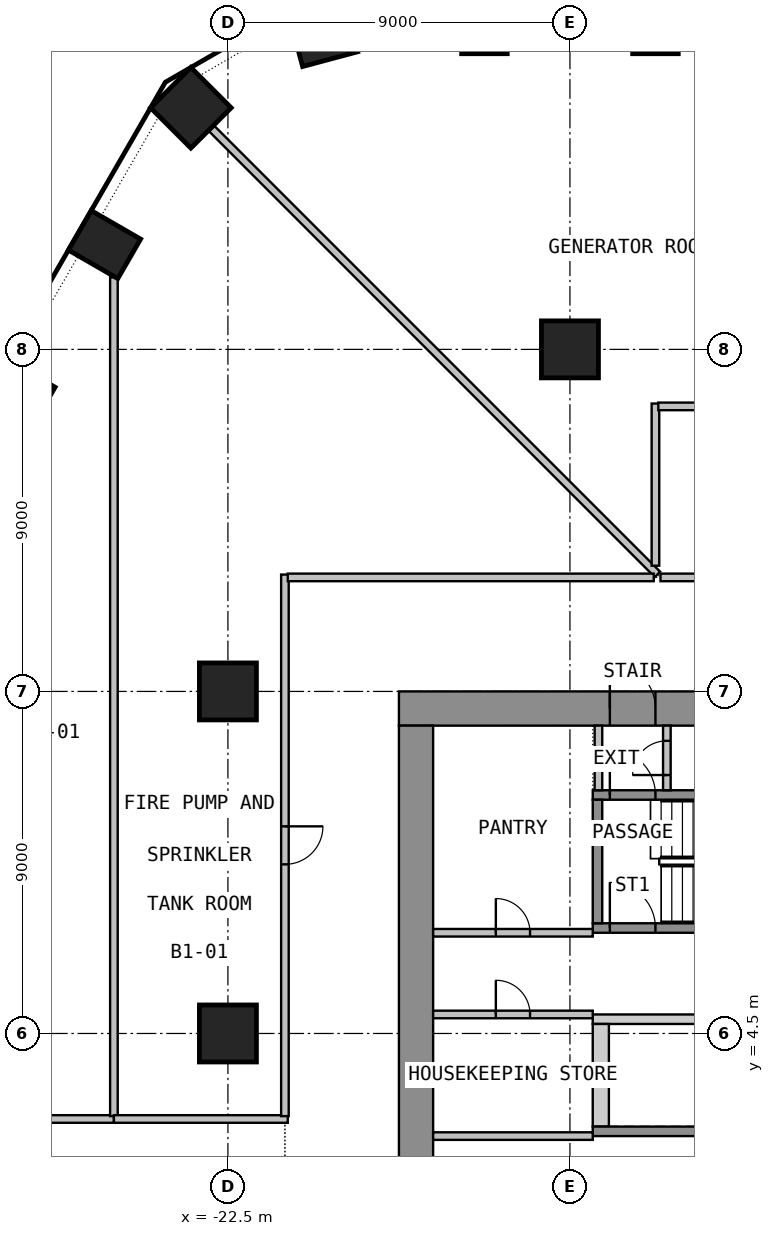
"""IFC4 building model, lengths in metres.
Left out: names, types, materials, properties, quantities, classifications, styles, units other than length and angle.
Written with IfcOpenShell. Run it as: python <this file> out.ifc"""

import sys

from ifc_helpers import new_model, si_unit, direction, frame, frame_2d, origin, origin_2d, place, context, subcontext, project, spatial, polyline, rectangle, circle, outline, extrude, element, fill, save


model = new_model("IFC4")
c1 = context("Model", 3, precision=1e-05, world=origin(), true_north=direction((0.0, 1.0)))
c2 = subcontext(c1, "Body", "Model", "MODEL_VIEW")
j1 = project(units=[si_unit("LENGTHUNIT", "METRE"), si_unit("PLANEANGLEUNIT", "RADIAN")], contexts=[c1])
p1 = place(None, origin())
s1 = spatial("IfcSite", under=j1, at=p1, CompositionType="ELEMENT")
p2 = place(p1, origin())
s2 = spatial("IfcBuilding", under=s1, at=p2, CompositionType="ELEMENT")
p3 = place(p2, frame((0.0, 0.0, -5.0)))
s3 = spatial("IfcBuildingStorey", under=s2, at=p3, CompositionType="ELEMENT", Elevation=-5.0)
for number, where, z_axis, x_axis in (
    (1, (-11.25, 31.03, 0.0), (0.0, 0.0, 1.0), (-1.0, 0.0, 0.0)),
    (2, (-15.75, 31.03, 0.0), (0.0, 0.0, 1.0), (-1.0, 0.0, 0.0)),
):
    element("IfcColumn", number, at=place(p3, frame(where, z_axis=z_axis, x_axis=x_axis)), inside=s3, PredefinedType="COLUMN", context=c2, shape_type="SweptSolid", body=[
        extrude(rectangle(XDim=1.2, YDim=1.5, at=origin_2d()), origin(), (0.0, 0.0, 1.0), 4.55),
    ])
for number, where, z_axis, x_axis in (
    (3, (-20.004, 30.861, 0.0), (0.0, 0.0, 1.0), (-0.966, -0.259, 0.0)),
    (4, (-23.475, 28.857, 0.0), (0.0, 0.0, 1.0), (-0.707, -0.707, 0.0)),
):
    element("IfcColumn", number, at=place(p3, frame(where, z_axis=z_axis, x_axis=x_axis)), inside=s3, PredefinedType="COLUMN", context=c2, shape_type="SweptSolid", body=[
        extrude(rectangle(XDim=1.5, YDim=1.5, at=origin_2d()), origin(), (0.0, 0.0, 1.0), 4.55),
    ])
for number, where, z_axis, x_axis in (
    (5, (-25.748, 25.258, 0.0), (0.0, 0.0, 1.0), (-0.5, -0.866, 0.0)),
    (6, (-27.998, 21.361, 0.0), (0.0, 0.0, 1.0), (-0.5, -0.866, 0.0)),
):
    element("IfcColumn", number, at=place(p3, frame(where, z_axis=z_axis, x_axis=x_axis)), inside=s3, PredefinedType="COLUMN", context=c2, shape_type="SweptSolid", body=[
        extrude(rectangle(XDim=1.2, YDim=1.5, at=origin_2d()), origin(), (0.0, 0.0, 1.0), 4.55),
    ])
for number, where, z_axis, x_axis in (
    (7, (-22.5, 4.5, 0.0), (0.0, 0.0, 1.0), (1.0, 0.0, 0.0)),
    (8, (-22.5, 13.5, 0.0), (0.0, 0.0, 1.0), (1.0, 0.0, 0.0)),
    (9, (-13.5, 22.5, 0.0), (0.0, 0.0, 1.0), (1.0, 0.0, 0.0)),
):
    element("IfcColumn", number, at=place(p3, frame(where, z_axis=z_axis, x_axis=x_axis)), inside=s3, PredefinedType="COLUMN", context=c2, shape_type="SweptSolid", body=[
        extrude(circle(Radius=0.75, at=origin_2d()), origin(), (0.0, 0.0, 1.0), 4.55),
    ])
p4 = place(p3, frame((-18.0, 13.05, 0.0), z_axis=(0.0, 0.0, 1.0), x_axis=(1.0, 0.0, 0.0)))
e10 = element("IfcWall", 10, at=p4, inside=s3, PredefinedType="SHEAR", context=c2, shape_type="SweptSolid", body=[
    extrude(rectangle(XDim=36.0, YDim=0.9, at=frame_2d((18.0, 0.0))), origin(), (0.0, 0.0, 1.0), 4.55),
])
p5 = place(p4, frame((16.8, 0.0, 0.0)))
e11 = element("IfcOpeningElement", 11, at=p5, cuts=e10, PredefinedType="OPENING", context=c2, shape_type="SweptSolid", body=[
    extrude(rectangle(XDim=2.4, YDim=2.1, at=frame_2d((1.2, 1.05))), frame((0.0, 0.46, 0.0), z_axis=(0.0, -1.0, 0.0), x_axis=(1.0, 0.0, 0.0)), (0.0, 0.0, 1.0), 0.92),
])
p6 = place(p4, frame((5.55, 0.0, 0.0)))
e12 = element("IfcOpeningElement", 12, at=p6, cuts=e10, PredefinedType="OPENING", context=c2, shape_type="SweptSolid", body=[
    extrude(rectangle(XDim=1.2, YDim=2.1, at=frame_2d((0.6, 1.05))), frame((0.0, 0.46, 0.0), z_axis=(0.0, -1.0, 0.0), x_axis=(1.0, 0.0, 0.0)), (0.0, 0.0, 1.0), 0.92),
])
p7 = place(p4, frame((29.25, 0.0, 0.0)))
e13 = element("IfcOpeningElement", 13, at=p7, cuts=e10, PredefinedType="OPENING", context=c2, shape_type="SweptSolid", body=[
    extrude(rectangle(XDim=1.2, YDim=2.1, at=frame_2d((0.6, 1.05))), frame((0.0, 0.46, 0.0), z_axis=(0.0, -1.0, 0.0), x_axis=(1.0, 0.0, 0.0)), (0.0, 0.0, 1.0), 0.92),
])
p8 = place(p3, frame((-17.55, -12.6, 0.0), z_axis=(0.0, 0.0, 1.0), x_axis=(0.0, 1.0, 0.0)))
e14 = element("IfcWall", 14, at=p8, inside=s3, PredefinedType="SHEAR", context=c2, shape_type="SweptSolid", body=[
    extrude(rectangle(XDim=25.2, YDim=0.9, at=frame_2d((12.6, 0.0))), origin(), (0.0, 0.0, 1.0), 4.55),
])
p9 = place(p8, frame((11.4, 0.0, 0.0)))
e15 = element("IfcOpeningElement", 15, at=p9, cuts=e14, PredefinedType="OPENING", context=c2, shape_type="SweptSolid", body=[
    extrude(rectangle(XDim=2.4, YDim=2.1, at=frame_2d((1.2, 1.05))), frame((0.0, 0.46, 0.0), z_axis=(0.0, -1.0, 0.0), x_axis=(1.0, 0.0, 0.0)), (0.0, 0.0, 1.0), 0.92),
])
p10 = place(p3, origin())
e16 = element("IfcWall", 16, at=p10, inside=s3, PredefinedType="SHEAR", context=c2, shape_type="SweptSolid", body=[
    extrude(outline(polyline([(-12.9, 4.75), (12.9, 4.75), (12.9, 5.0), (-12.9, 5.0), (-12.9, 4.75)])), origin(), (0.0, 0.0, 1.0), 4.55),
])
p11 = place(p3, origin())
e17 = element("IfcWall", 17, at=p11, inside=s3, PredefinedType="SHEAR", context=c2, shape_type="SweptSolid", body=[
    extrude(outline(polyline([(-12.9, 2.05), (-12.475, 2.05), (-12.475, 4.75), (-12.9, 4.75), (-12.9, 2.05)])), origin(), (0.0, 0.0, 1.0), 4.55),
])
p12 = place(p3, frame((-12.9, 1.925, 0.0), z_axis=(0.0, 0.0, 1.0), x_axis=(1.0, 0.0, 0.0)))
e18 = element("IfcWall", 18, at=p12, inside=s3, PredefinedType="SHEAR", context=c2, shape_type="SweptSolid", body=[
    extrude(rectangle(XDim=25.8, YDim=0.25, at=frame_2d((12.9, 0.0))), origin(), (0.0, 0.0, 1.0), 4.55),
])
p13 = place(p12, frame((12.3, 0.0, 0.0)))
e19 = element("IfcOpeningElement", 19, at=p13, cuts=e18, PredefinedType="OPENING", context=c2, shape_type="SweptSolid", body=[
    extrude(rectangle(XDim=1.2, YDim=2.1, at=frame_2d((0.6, 1.05))), frame((0.0, 0.135, 0.0), z_axis=(0.0, -1.0, 0.0), x_axis=(1.0, 0.0, 0.0)), (0.0, 0.0, 1.0), 0.27),
])
p14 = place(p12, frame((23.5, 0.0, 0.0)))
e20 = element("IfcOpeningElement", 20, at=p14, cuts=e18, PredefinedType="OPENING", context=c2, shape_type="SweptSolid", body=[
    extrude(rectangle(XDim=1.2, YDim=2.1, at=frame_2d((0.6, 1.05))), frame((0.0, 0.135, 0.0), z_axis=(0.0, -1.0, 0.0), x_axis=(1.0, 0.0, 0.0)), (0.0, 0.0, 1.0), 0.27),
])
p15 = place(p3, frame((-12.9, 7.275, 0.0), z_axis=(0.0, 0.0, 1.0), x_axis=(1.0, 0.0, 0.0)))
e21 = element("IfcWall", 21, at=p15, inside=s3, PredefinedType="SHEAR", context=c2, shape_type="SweptSolid", body=[
    extrude(rectangle(XDim=10.1, YDim=0.25, at=frame_2d((5.05, 0.0))), origin(), (0.0, 0.0, 1.0), 4.55),
])
p16 = place(p15, frame((0.45, 0.0, 0.0)))
e22 = element("IfcOpeningElement", 22, at=p16, cuts=e21, PredefinedType="OPENING", context=c2, shape_type="SweptSolid", body=[
    extrude(rectangle(XDim=1.2, YDim=2.1, at=frame_2d((0.6, 1.05))), frame((0.0, 0.135, 0.0), z_axis=(0.0, -1.0, 0.0), x_axis=(1.0, 0.0, 0.0)), (0.0, 0.0, 1.0), 0.27),
])
p17 = place(p3, frame((-12.9, 10.775, 0.0), z_axis=(0.0, 0.0, 1.0), x_axis=(1.0, 0.0, 0.0)))
e23 = element("IfcWall", 23, at=p17, inside=s3, PredefinedType="SHEAR", context=c2, shape_type="SweptSolid", body=[
    extrude(rectangle(XDim=10.1, YDim=0.25, at=frame_2d((5.05, 0.0))), origin(), (0.0, 0.0, 1.0), 4.55),
])
p18 = place(p17, frame((0.45, 0.0, 0.0)))
e24 = element("IfcOpeningElement", 24, at=p18, cuts=e23, PredefinedType="OPENING", context=c2, shape_type="SweptSolid", body=[
    extrude(rectangle(XDim=1.2, YDim=2.1, at=frame_2d((0.6, 1.05))), frame((0.0, 0.135, 0.0), z_axis=(0.0, -1.0, 0.0), x_axis=(1.0, 0.0, 0.0)), (0.0, 0.0, 1.0), 0.27),
])
p19 = place(p3, frame((-12.775, 7.4, 0.0), z_axis=(0.0, 0.0, 1.0), x_axis=(0.0, 1.0, 0.0)))
e25 = element("IfcWall", 25, at=p19, inside=s3, PredefinedType="SHEAR", context=c2, shape_type="SweptSolid", body=[
    extrude(rectangle(XDim=3.25, YDim=0.25, at=frame_2d((1.625, 0.0))), origin(), (0.0, 0.0, 1.0), 4.55),
])
p20 = place(p3, frame((-12.75, 10.9, 0.0), z_axis=(0.0, 0.0, 1.0), x_axis=(0.0, 1.0, 0.0)))
e26 = element("IfcWall", 26, at=p20, inside=s3, PredefinedType="PARTITIONING", context=c2, shape_type="SweptSolid", body=[
    extrude(rectangle(XDim=1.7, YDim=0.2, at=frame_2d((0.85, 0.0))), origin(), (0.0, 0.0, 1.0), 4.55),
])
p21 = place(p3, frame((-10.95, 10.9, 0.0), z_axis=(0.0, 0.0, 1.0), x_axis=(0.0, 1.0, 0.0)))
e27 = element("IfcWall", 27, at=p21, inside=s3, PredefinedType="PARTITIONING", context=c2, shape_type="SweptSolid", body=[
    extrude(rectangle(XDim=1.7, YDim=0.2, at=frame_2d((0.85, 0.0))), origin(), (0.0, 0.0, 1.0), 4.55),
])
p22 = place(p21, frame((0.4, 0.0, 0.0)))
e28 = element("IfcOpeningElement", 28, at=p22, cuts=e27, PredefinedType="OPENING", context=c2, shape_type="SweptSolid", body=[
    extrude(rectangle(XDim=0.9, YDim=2.1, at=frame_2d((0.45, 1.05))), frame((0.0, 0.11, 0.0), z_axis=(0.0, -1.0, 0.0), x_axis=(1.0, 0.0, 0.0)), (0.0, 0.0, 1.0), 0.22),
])
p23 = place(p3, frame((-17.1, 7.15, 0.0), z_axis=(0.0, 0.0, 1.0), x_axis=(1.0, 0.0, 0.0)))
e29 = element("IfcWall", 29, at=p23, inside=s3, PredefinedType="PARTITIONING", context=c2, shape_type="SweptSolid", body=[
    extrude(rectangle(XDim=4.2, YDim=0.2, at=frame_2d((2.1, 0.0))), origin(), (0.0, 0.0, 1.0), 4.55),
])
p24 = place(p23, frame((1.65, 0.0, 0.0)))
e30 = element("IfcOpeningElement", 30, at=p24, cuts=e29, PredefinedType="OPENING", context=c2, shape_type="SweptSolid", body=[
    extrude(rectangle(XDim=0.9, YDim=2.1, at=frame_2d((0.45, 1.05))), frame((0.0, 0.11, 0.0), z_axis=(0.0, -1.0, 0.0), x_axis=(1.0, 0.0, 0.0)), (0.0, 0.0, 1.0), 0.22),
])
p25 = place(p3, frame((-17.1, 5.0, 0.0), z_axis=(0.0, 0.0, 1.0), x_axis=(1.0, 0.0, 0.0)))
e31 = element("IfcWall", 31, at=p25, inside=s3, PredefinedType="PARTITIONING", context=c2, shape_type="SweptSolid", body=[
    extrude(rectangle(XDim=4.2, YDim=0.2, at=frame_2d((2.1, 0.0))), origin(), (0.0, 0.0, 1.0), 4.55),
])
p26 = place(p25, frame((1.65, 0.0, 0.0)))
e32 = element("IfcOpeningElement", 32, at=p26, cuts=e31, PredefinedType="OPENING", context=c2, shape_type="SweptSolid", body=[
    extrude(rectangle(XDim=0.9, YDim=2.1, at=frame_2d((0.45, 1.05))), frame((0.0, 0.11, 0.0), z_axis=(0.0, -1.0, 0.0), x_axis=(1.0, 0.0, 0.0)), (0.0, 0.0, 1.0), 0.22),
])
p27 = place(p3, frame((-17.1, 1.8, 0.0), z_axis=(0.0, 0.0, 1.0), x_axis=(1.0, 0.0, 0.0)))
e33 = element("IfcWall", 33, at=p27, inside=s3, PredefinedType="PARTITIONING", context=c2, shape_type="SweptSolid", body=[
    extrude(rectangle(XDim=4.2, YDim=0.2, at=frame_2d((2.1, 0.0))), origin(), (0.0, 0.0, 1.0), 4.55),
])
p28 = place(p3, frame((-30.897, 2.25, 0.0), z_axis=(0.0, 0.0, 1.0), x_axis=(1.0, 0.0, 0.0)))
e34 = element("IfcWall", 34, at=p28, inside=s3, PredefinedType="PARTITIONING", context=c2, shape_type="SweptSolid", body=[
    extrude(rectangle(XDim=5.397, YDim=0.2, at=frame_2d((2.698, 0.0))), origin(), (0.0, 0.0, 1.0), 4.55),
])
p29 = place(p28, frame((2.198, 0.0, 0.0)))
e35 = element("IfcOpeningElement", 35, at=p29, cuts=e34, PredefinedType="OPENING", context=c2, shape_type="SweptSolid", body=[
    extrude(rectangle(XDim=1.0, YDim=2.1, at=frame_2d((0.5, 1.05))), frame((0.0, 0.11, 0.0), z_axis=(0.0, -1.0, 0.0), x_axis=(1.0, 0.0, 0.0)), (0.0, 0.0, 1.0), 0.22),
])
p30 = place(p3, frame((-25.5, 24.399, 0.0), z_axis=(0.0, 0.0, 1.0), x_axis=(0.0, -1.0, 0.0)))
e36 = element("IfcWall", 36, at=p30, inside=s3, PredefinedType="PARTITIONING", context=c2, shape_type="SweptSolid", body=[
    extrude(rectangle(XDim=22.074, YDim=0.2, at=frame_2d((11.037, 0.0))), origin(), (0.0, 0.0, 1.0), 4.55),
])
p31 = place(p3, frame((-25.5, 2.25, 0.0), z_axis=(0.0, 0.0, 1.0), x_axis=(1.0, 0.0, 0.0)))
e37 = element("IfcWall", 37, at=p31, inside=s3, PredefinedType="PARTITIONING", context=c2, shape_type="SweptSolid", body=[
    extrude(rectangle(XDim=4.575, YDim=0.2, at=frame_2d((2.288, 0.0))), origin(), (0.0, 0.0, 1.0), 4.55),
])
p32 = place(p3, frame((-22.93, 28.313, 0.0), z_axis=(0.0, 0.0, 1.0), x_axis=(0.707114137878, -0.707099424419, 0.0)))
e38 = element("IfcWall", 38, at=p32, inside=s3, PredefinedType="PARTITIONING", context=c2, shape_type="SweptSolid", body=[
    extrude(rectangle(XDim=16.593, YDim=0.2, at=frame_2d((8.296, 0.0))), origin(), (0.0, 0.0, 1.0), 4.55),
])
p33 = place(p3, frame((-21.0, 16.575, 0.0), z_axis=(0.0, 0.0, 1.0), x_axis=(0.0, -1.0, 0.0)))
e39 = element("IfcWall", 39, at=p33, inside=s3, PredefinedType="PARTITIONING", context=c2, shape_type="SweptSolid", body=[
    extrude(rectangle(XDim=14.25, YDim=0.2, at=frame_2d((7.125, 0.0))), origin(), (0.0, 0.0, 1.0), 4.55),
])
p34 = place(p33, frame((6.625, 0.0, 0.0)))
e40 = element("IfcOpeningElement", 40, at=p34, cuts=e39, PredefinedType="OPENING", context=c2, shape_type="SweptSolid", body=[
    extrude(rectangle(XDim=1.0, YDim=2.1, at=frame_2d((0.5, 1.05))), frame((0.0, 0.11, 0.0), z_axis=(0.0, -1.0, 0.0), x_axis=(1.0, 0.0, 0.0)), (0.0, 0.0, 1.0), 0.22),
])
p35 = place(p3, frame((-11.295, 16.5, 0.0), z_axis=(0.0, 0.0, 1.0), x_axis=(-1.0, 0.0, 0.0)))
e41 = element("IfcWall", 41, at=p35, inside=s3, PredefinedType="PARTITIONING", context=c2, shape_type="SweptSolid", body=[
    extrude(rectangle(XDim=9.63, YDim=0.2, at=frame_2d((4.815, 0.0))), origin(), (0.0, 0.0, 1.0), 4.55),
])
p36 = place(p3, frame((-11.25, 21.075, 0.0), z_axis=(0.0, 0.0, 1.0), x_axis=(0.0, -1.0, 0.0)))
e42 = element("IfcWall", 42, at=p36, inside=s3, PredefinedType="PARTITIONING", context=c2, shape_type="SweptSolid", body=[
    extrude(rectangle(XDim=4.267, YDim=0.2, at=frame_2d((2.133, 0.0))), origin(), (0.0, 0.0, 1.0), 4.55),
])
p37 = place(p3, frame((-2.325, 21.0, 0.0), z_axis=(0.0, 0.0, 1.0), x_axis=(-1.0, 0.0, 0.0)))
e43 = element("IfcWall", 43, at=p37, inside=s3, PredefinedType="PARTITIONING", context=c2, shape_type="SweptSolid", body=[
    extrude(rectangle(XDim=8.85, YDim=0.2, at=frame_2d((4.425, 0.0))), origin(), (0.0, 0.0, 1.0), 4.55),
])
p38 = place(p3, frame((-2.175, 16.5, 0.0), z_axis=(0.0, 0.0, 1.0), x_axis=(-1.0, 0.0, 0.0)))
e44 = element("IfcWall", 44, at=p38, inside=s3, PredefinedType="PARTITIONING", context=c2, shape_type="SweptSolid", body=[
    extrude(rectangle(XDim=8.942, YDim=0.2, at=frame_2d((4.471, 0.0))), origin(), (0.0, 0.0, 1.0), 4.55),
])
p39 = place(p38, frame((3.971, 0.0, 0.0)))
e45 = element("IfcOpeningElement", 45, at=p39, cuts=e44, PredefinedType="OPENING", context=c2, shape_type="SweptSolid", body=[
    extrude(rectangle(XDim=1.0, YDim=2.1, at=frame_2d((0.5, 1.05))), frame((0.0, 0.11, 0.0), z_axis=(0.0, -1.0, 0.0), x_axis=(1.0, 0.0, 0.0)), (0.0, 0.0, 1.0), 0.22),
])
p40 = place(p6, origin())
e46 = element("IfcDoor", 46, at=p40, inside=s3, OperationType="SINGLE_SWING_RIGHT", PredefinedType="DOOR", context=c2, shape_type="SweptSolid", body=[
    extrude(rectangle(XDim=1.2, YDim=2.1, at=frame_2d((0.6, 1.05))), frame((0.0, 0.025, 0.0), z_axis=(0.0, -1.0, 0.0), x_axis=(1.0, 0.0, 0.0)), (0.0, 0.0, 1.0), 0.05),
])
fill(e12, e46)
p41 = place(p16, origin())
e47 = element("IfcDoor", 47, at=p41, inside=s3, OperationType="SINGLE_SWING_LEFT", PredefinedType="DOOR", context=c2, shape_type="SweptSolid", body=[
    extrude(rectangle(XDim=1.2, YDim=2.1, at=frame_2d((0.6, 1.05))), frame((0.0, 0.025, 0.0), z_axis=(0.0, -1.0, 0.0), x_axis=(1.0, 0.0, 0.0)), (0.0, 0.0, 1.0), 0.05),
])
fill(e22, e47)
p42 = place(p18, origin())
e48 = element("IfcDoor", 48, at=p42, inside=s3, OperationType="SINGLE_SWING_RIGHT", PredefinedType="DOOR", context=c2, shape_type="SweptSolid", body=[
    extrude(rectangle(XDim=1.2, YDim=2.1, at=frame_2d((0.6, 1.05))), frame((0.0, 0.025, 0.0), z_axis=(0.0, -1.0, 0.0), x_axis=(1.0, 0.0, 0.0)), (0.0, 0.0, 1.0), 0.05),
])
fill(e24, e48)
p43 = place(p22, origin())
e49 = element("IfcDoor", 49, at=p43, inside=s3, OperationType="SINGLE_SWING_LEFT", PredefinedType="DOOR", context=c2, shape_type="SweptSolid", body=[
    extrude(rectangle(XDim=0.9, YDim=2.1, at=frame_2d((0.45, 1.05))), frame((0.0, 0.025, 0.0), z_axis=(0.0, -1.0, 0.0), x_axis=(1.0, 0.0, 0.0)), (0.0, 0.0, 1.0), 0.05),
])
fill(e28, e49)
p44 = place(p24, origin())
e50 = element("IfcDoor", 50, at=p44, inside=s3, OperationType="SINGLE_SWING_LEFT", PredefinedType="DOOR", context=c2, shape_type="SweptSolid", body=[
    extrude(rectangle(XDim=0.9, YDim=2.1, at=frame_2d((0.45, 1.05))), frame((0.0, 0.025, 0.0), z_axis=(0.0, -1.0, 0.0), x_axis=(1.0, 0.0, 0.0)), (0.0, 0.0, 1.0), 0.05),
])
fill(e30, e50)
p45 = place(p26, origin())
e51 = element("IfcDoor", 51, at=p45, inside=s3, OperationType="SINGLE_SWING_LEFT", PredefinedType="DOOR", context=c2, shape_type="SweptSolid", body=[
    extrude(rectangle(XDim=0.9, YDim=2.1, at=frame_2d((0.45, 1.05))), frame((0.0, 0.025, 0.0), z_axis=(0.0, -1.0, 0.0), x_axis=(1.0, 0.0, 0.0)), (0.0, 0.0, 1.0), 0.05),
])
fill(e32, e51)
p46 = place(p34, origin())
e52 = element("IfcDoor", 52, at=p46, inside=s3, OperationType="SINGLE_SWING_LEFT", PredefinedType="DOOR", context=c2, shape_type="SweptSolid", body=[
    extrude(rectangle(XDim=1.0, YDim=2.1, at=frame_2d((0.5, 1.05))), frame((0.0, 0.025, 0.0), z_axis=(0.0, -1.0, 0.0), x_axis=(1.0, 0.0, 0.0)), (0.0, 0.0, 1.0), 0.05),
])
fill(e40, e52)
save(model, sys.argv[1])
